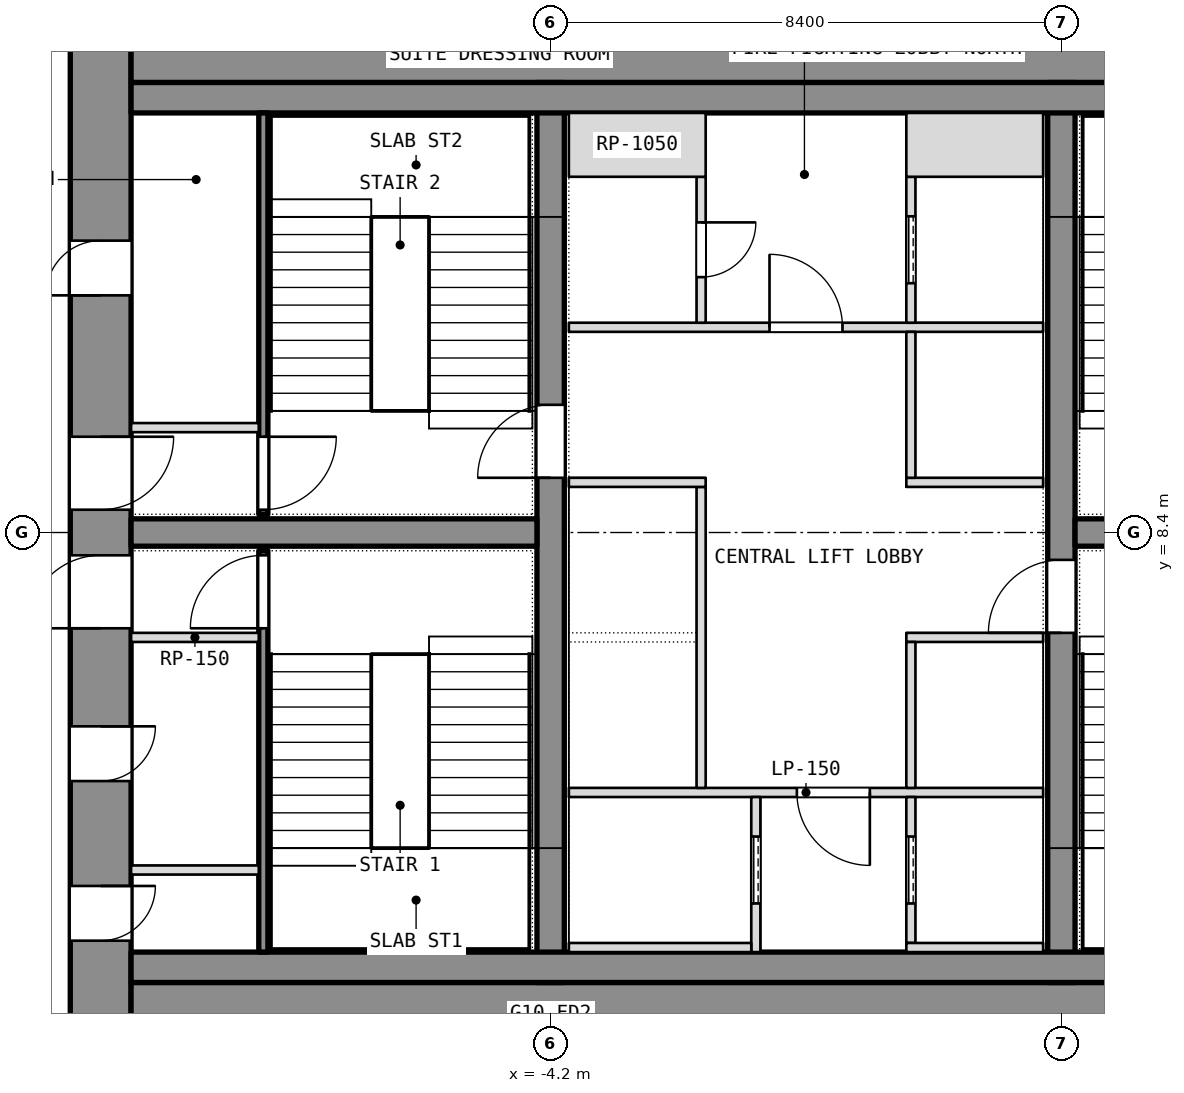
"""IFC4 building model, lengths in metres.
Left out: names, types, materials, properties, quantities, classifications, styles, units other than length and angle.
Written with IfcOpenShell. Run it as: python <this file> out.ifc"""

import sys

from ifc_helpers import new_model, si_unit, direction, frame, frame_2d, origin, place, context, subcontext, project, spatial, rectangle, extrude, element, fill, save


model = new_model("IFC4")
c1 = context("Model", 3, precision=1e-05, world=origin(), true_north=direction((0.0, 1.0)))
c2 = subcontext(c1, "Body", "Model", "MODEL_VIEW")
j1 = project(units=[si_unit("LENGTHUNIT", "METRE"), si_unit("PLANEANGLEUNIT", "RADIAN")], contexts=[c1])
p1 = place(None, origin())
s1 = spatial("IfcSite", under=j1, at=p1, CompositionType="ELEMENT")
p2 = place(p1, origin())
s2 = spatial("IfcBuilding", under=s1, at=p2, CompositionType="ELEMENT")
p3 = place(p2, frame((0.0, 0.0, 130.1)))
s3 = spatial("IfcBuildingStorey", under=s2, at=p3, CompositionType="ELEMENT", Elevation=130.1)
p4 = place(p3, frame((-11.6, 0.0, 0.0), z_axis=(0.0, 0.0, 1.0), x_axis=(0.0, 1.0, 0.0)))
e1 = element("IfcWall", 1, at=p4, inside=s3, PredefinedType="SHEAR", context=c2, shape_type="SweptSolid", body=[
    extrude(rectangle(XDim=16.8, YDim=1.0, at=frame_2d((8.4, 0.0))), origin(), (0.0, 0.0, 1.0), 3.6),
])
p5 = place(p4, frame((1.688, 0.0, 0.0)))
e2 = element("IfcOpeningElement", 2, at=p5, cuts=e1, PredefinedType="OPENING", context=c2, shape_type="SweptSolid", body=[
    extrude(rectangle(XDim=0.9, YDim=2.1, at=frame_2d((0.45, 1.05))), frame((0.0, 0.5, 0.0), z_axis=(0.0, -1.0, 0.0), x_axis=(1.0, 0.0, 0.0)), (0.0, 0.0, 1.0), 1.0),
])
p6 = place(p4, frame((4.312, 0.0, 0.0)))
e3 = element("IfcOpeningElement", 3, at=p6, cuts=e1, PredefinedType="OPENING", context=c2, shape_type="SweptSolid", body=[
    extrude(rectangle(XDim=0.9, YDim=2.1, at=frame_2d((0.45, 1.05))), frame((0.0, 0.5, 0.0), z_axis=(0.0, -1.0, 0.0), x_axis=(1.0, 0.0, 0.0)), (0.0, 0.0, 1.0), 1.0),
])
p7 = place(p4, frame((6.825, 0.0, 0.0)))
e4 = element("IfcOpeningElement", 4, at=p7, cuts=e1, PredefinedType="OPENING", context=c2, shape_type="SweptSolid", body=[
    extrude(rectangle(XDim=1.2, YDim=2.1, at=frame_2d((0.6, 1.05))), frame((0.0, 0.5, 0.0), z_axis=(0.0, -1.0, 0.0), x_axis=(1.0, 0.0, 0.0)), (0.0, 0.0, 1.0), 1.0),
])
p8 = place(p4, frame((12.3, 0.0, 0.0)))
e5 = element("IfcOpeningElement", 5, at=p8, cuts=e1, PredefinedType="OPENING", context=c2, shape_type="SweptSolid", body=[
    extrude(rectangle(XDim=0.9, YDim=2.1, at=frame_2d((0.45, 1.05))), frame((0.0, 0.5, 0.0), z_axis=(0.0, -1.0, 0.0), x_axis=(1.0, 0.0, 0.0)), (0.0, 0.0, 1.0), 1.0),
])
p9 = place(p4, frame((8.775, 0.0, 0.0)))
e6 = element("IfcOpeningElement", 6, at=p9, cuts=e1, PredefinedType="OPENING", context=c2, shape_type="SweptSolid", body=[
    extrude(rectangle(XDim=1.2, YDim=2.1, at=frame_2d((0.6, 1.05))), frame((0.0, 0.5, 0.0), z_axis=(0.0, -1.0, 0.0), x_axis=(1.0, 0.0, 0.0)), (0.0, 0.0, 1.0), 1.0),
])
for number, where, z_axis, x_axis in (
    (7, (-11.1, 0.5, 0.0), (0.0, 0.0, 1.0), (1.0, 0.0, 0.0)),
    (8, (-11.1, 16.3, 0.0), (0.0, 0.0, 1.0), (1.0, 0.0, 0.0)),
):
    element("IfcWall", number, at=place(p3, frame(where, z_axis=z_axis, x_axis=x_axis)), inside=s3, PredefinedType="SHEAR", context=c2, shape_type="SweptSolid", body=[
        extrude(rectangle(XDim=22.2, YDim=1.0, at=frame_2d((11.1, 0.0))), origin(), (0.0, 0.0, 1.0), 3.6),
    ])
p10 = place(p3, frame((-4.2, 1.0, 0.0), z_axis=(0.0, 0.0, 1.0), x_axis=(0.0, 1.0, 0.0)))
e9 = element("IfcWall", 9, at=p10, inside=s3, PredefinedType="SHEAR", context=c2, shape_type="SweptSolid", body=[
    extrude(rectangle(XDim=14.8, YDim=0.45, at=frame_2d((7.4, 0.0))), origin(), (0.0, 0.0, 1.0), 3.6),
])
p11 = place(p10, frame((8.3, 0.0, 0.0)))
e10 = element("IfcOpeningElement", 10, at=p11, cuts=e9, PredefinedType="OPENING", context=c2, shape_type="SweptSolid", body=[
    extrude(rectangle(XDim=1.2, YDim=2.1, at=frame_2d((0.6, 1.05))), frame((0.0, 0.225, 0.0), z_axis=(0.0, -1.0, 0.0), x_axis=(1.0, 0.0, 0.0)), (0.0, 0.0, 1.0), 0.45),
])
p12 = place(p3, frame((4.2, 1.0, 0.0), z_axis=(0.0, 0.0, 1.0), x_axis=(0.0, 1.0, 0.0)))
e11 = element("IfcWall", 11, at=p12, inside=s3, PredefinedType="SHEAR", context=c2, shape_type="SweptSolid", body=[
    extrude(rectangle(XDim=14.8, YDim=0.45, at=frame_2d((7.4, 0.0))), origin(), (0.0, 0.0, 1.0), 3.6),
])
p13 = place(p12, frame((5.75, 0.0, 0.0)))
e12 = element("IfcOpeningElement", 12, at=p13, cuts=e11, PredefinedType="OPENING", context=c2, shape_type="SweptSolid", body=[
    extrude(rectangle(XDim=1.2, YDim=2.1, at=frame_2d((0.6, 1.05))), frame((0.0, 0.225, 0.0), z_axis=(0.0, -1.0, 0.0), x_axis=(1.0, 0.0, 0.0)), (0.0, 0.0, 1.0), 0.45),
])
for number, where, z_axis, x_axis in (
    (13, (-11.1, 8.4, 0.0), (0.0, 0.0, 1.0), (1.0, 0.0, 0.0)),
    (14, (4.425, 8.4, 0.0), (0.0, 0.0, 1.0), (1.0, 0.0, 0.0)),
):
    element("IfcWall", number, at=place(p3, frame(where, z_axis=z_axis, x_axis=x_axis)), inside=s3, PredefinedType="SHEAR", context=c2, shape_type="SweptSolid", body=[
        extrude(rectangle(XDim=6.675, YDim=0.45, at=frame_2d((3.337, 0.0))), origin(), (0.0, 0.0, 1.0), 3.6),
    ])
for number, where, z_axis, x_axis in (
    (15, (-11.1, 1.25, 0.0), (0.0, 0.0, 1.0), (1.0, 0.0, 0.0)),
    (16, (-11.1, 15.55, 0.0), (0.0, 0.0, 1.0), (1.0, 0.0, 0.0)),
):
    element("IfcWall", number, at=place(p3, frame(where, z_axis=z_axis, x_axis=x_axis)), inside=s3, PredefinedType="PARTITIONING", context=c2, shape_type="SweptSolid", body=[
        extrude(rectangle(XDim=22.2, YDim=0.5, at=frame_2d((11.1, 0.0))), origin(), (0.0, 0.0, 1.0), 3.34),
    ])
p14 = place(p3, frame((-8.925, 1.5, 0.0), z_axis=(0.0, 0.0, 1.0), x_axis=(0.0, 1.0, 0.0)))
e17 = element("IfcWall", 17, at=p14, inside=s3, PredefinedType="SHEAR", context=c2, shape_type="SweptSolid", body=[
    extrude(rectangle(XDim=6.6, YDim=0.15, at=frame_2d((3.3, 0.0))), origin(), (0.0, 0.0, 1.0), 3.34),
])
p15 = place(p14, frame((5.325, 0.0, 0.0)))
e18 = element("IfcOpeningElement", 18, at=p15, cuts=e17, PredefinedType="OPENING", context=c2, shape_type="SweptSolid", body=[
    extrude(rectangle(XDim=1.2, YDim=2.1, at=frame_2d((0.6, 1.05))), frame((0.0, 0.075, 0.0), z_axis=(0.0, -1.0, 0.0), x_axis=(1.0, 0.0, 0.0)), (0.0, 0.0, 1.0), 0.15),
])
for number, where, z_axis, x_axis in (
    (19, (-11.1, 6.675, 0.0), (0.0, 0.0, 1.0), (1.0, 0.0, 0.0)),
    (20, (-11.1, 2.85, 0.0), (0.0, 0.0, 1.0), (1.0, 0.0, 0.0)),
):
    element("IfcWall", number, at=place(p3, frame(where, z_axis=z_axis, x_axis=x_axis)), inside=s3, PredefinedType="PARTITIONING", context=c2, shape_type="SweptSolid", body=[
        extrude(rectangle(XDim=2.1, YDim=0.15, at=frame_2d((1.05, 0.0))), origin(), (0.0, 0.0, 1.0), 3.34),
    ])
p16 = place(p3, frame((-8.925, 8.7, 0.0), z_axis=(0.0, 0.0, 1.0), x_axis=(0.0, 1.0, 0.0)))
e21 = element("IfcWall", 21, at=p16, inside=s3, PredefinedType="SHEAR", context=c2, shape_type="SweptSolid", body=[
    extrude(rectangle(XDim=6.6, YDim=0.15, at=frame_2d((3.3, 0.0))), origin(), (0.0, 0.0, 1.0), 3.34),
])
p17 = place(p16, frame((0.075, 0.0, 0.0)))
e22 = element("IfcOpeningElement", 22, at=p17, cuts=e21, PredefinedType="OPENING", context=c2, shape_type="SweptSolid", body=[
    extrude(rectangle(XDim=1.2, YDim=2.1, at=frame_2d((0.6, 1.05))), frame((0.0, 0.075, 0.0), z_axis=(0.0, -1.0, 0.0), x_axis=(1.0, 0.0, 0.0)), (0.0, 0.0, 1.0), 0.15),
])
p18 = place(p3, frame((-11.1, 10.125, 0.0), z_axis=(0.0, 0.0, 1.0), x_axis=(1.0, 0.0, 0.0)))
e23 = element("IfcWall", 23, at=p18, inside=s3, PredefinedType="PARTITIONING", context=c2, shape_type="SweptSolid", body=[
    extrude(rectangle(XDim=2.1, YDim=0.15, at=frame_2d((1.05, 0.0))), origin(), (0.0, 0.0, 1.0), 3.34),
])
p19 = place(p3, frame((-3.9, 4.125, 0.0), z_axis=(0.0, 0.0, 1.0), x_axis=(1.0, 0.0, 0.0)))
e24 = element("IfcWall", 24, at=p19, inside=s3, PredefinedType="PARTITIONING", context=c2, shape_type="SweptSolid", body=[
    extrude(rectangle(XDim=7.8, YDim=0.15, at=frame_2d((3.9, 0.0))), origin(), (0.0, 0.0, 1.0), 3.34),
])
p20 = place(p19, frame((3.75, 0.0, 0.0)))
e25 = element("IfcOpeningElement", 25, at=p20, cuts=e24, PredefinedType="OPENING", context=c2, shape_type="SweptSolid", body=[
    extrude(rectangle(XDim=1.2, YDim=2.1, at=frame_2d((0.6, 1.05))), frame((0.0, 0.075, 0.0), z_axis=(0.0, -1.0, 0.0), x_axis=(1.0, 0.0, 0.0)), (0.0, 0.0, 1.0), 0.15),
])
p21 = place(p3, frame((-3.9, 11.775, 0.0), z_axis=(0.0, 0.0, 1.0), x_axis=(1.0, 0.0, 0.0)))
e26 = element("IfcWall", 26, at=p21, inside=s3, PredefinedType="PARTITIONING", context=c2, shape_type="SweptSolid", body=[
    extrude(rectangle(XDim=7.8, YDim=0.15, at=frame_2d((3.9, 0.0))), origin(), (0.0, 0.0, 1.0), 3.34),
])
p22 = place(p21, frame((3.3, 0.0, 0.0)))
e27 = element("IfcOpeningElement", 27, at=p22, cuts=e26, PredefinedType="OPENING", context=c2, shape_type="SweptSolid", body=[
    extrude(rectangle(XDim=1.2, YDim=2.1, at=frame_2d((0.6, 1.05))), frame((0.0, 0.075, 0.0), z_axis=(0.0, -1.0, 0.0), x_axis=(1.0, 0.0, 0.0)), (0.0, 0.0, 1.0), 0.15),
])
p23 = place(p3, frame((-0.825, 1.5, 0.0), z_axis=(0.0, 0.0, 1.0), x_axis=(0.0, 1.0, 0.0)))
e28 = element("IfcWall", 28, at=p23, inside=s3, PredefinedType="SHEAR", context=c2, shape_type="SweptSolid", body=[
    extrude(rectangle(XDim=2.55, YDim=0.15, at=frame_2d((1.275, 0.0))), origin(), (0.0, 0.0, 1.0), 3.6),
])
p24 = place(p23, frame((0.8, 0.0, 0.0)))
e29 = element("IfcOpeningElement", 29, at=p24, cuts=e28, PredefinedType="OPENING", context=c2, shape_type="SweptSolid", body=[
    extrude(rectangle(XDim=1.1, YDim=2.1, at=frame_2d((0.55, 1.05))), frame((0.0, 0.075, 0.0), z_axis=(0.0, -1.0, 0.0), x_axis=(1.0, 0.0, 0.0)), (0.0, 0.0, 1.0), 0.15),
])
p25 = place(p3, frame((-3.9, 1.575, 0.0), z_axis=(0.0, 0.0, 1.0), x_axis=(1.0, 0.0, 0.0)))
e30 = element("IfcWall", 30, at=p25, inside=s3, PredefinedType="SHEAR", context=c2, shape_type="SweptSolid", body=[
    extrude(rectangle(XDim=3.0, YDim=0.15, at=frame_2d((1.5, 0.0))), origin(), (0.0, 0.0, 1.0), 3.6),
])
p26 = place(p3, frame((-1.725, 4.2, 0.0), z_axis=(0.0, 0.0, 1.0), x_axis=(0.0, 1.0, 0.0)))
e31 = element("IfcWall", 31, at=p26, inside=s3, PredefinedType="SHEAR", context=c2, shape_type="SweptSolid", body=[
    extrude(rectangle(XDim=4.95, YDim=0.15, at=frame_2d((2.475, 0.0))), origin(), (0.0, 0.0, 1.0), 3.6),
])
p27 = place(p3, frame((-3.9, 9.225, 0.0), z_axis=(0.0, 0.0, 1.0), x_axis=(1.0, 0.0, 0.0)))
e32 = element("IfcWall", 32, at=p27, inside=s3, PredefinedType="SHEAR", context=c2, shape_type="SweptSolid", body=[
    extrude(rectangle(XDim=2.25, YDim=0.15, at=frame_2d((1.125, 0.0))), origin(), (0.0, 0.0, 1.0), 3.6),
])
p28 = place(p3, frame((-1.725, 11.85, 0.0), z_axis=(0.0, 0.0, 1.0), x_axis=(0.0, 1.0, 0.0)))
e33 = element("IfcWall", 33, at=p28, inside=s3, PredefinedType="PARTITIONING", context=c2, shape_type="SweptSolid", body=[
    extrude(rectangle(XDim=2.4, YDim=0.15, at=frame_2d((1.2, 0.0))), origin(), (0.0, 0.0, 1.0), 3.34),
])
p29 = place(p28, frame((0.75, 0.0, 0.0)))
e34 = element("IfcOpeningElement", 34, at=p29, cuts=e33, PredefinedType="OPENING", context=c2, shape_type="SweptSolid", body=[
    extrude(rectangle(XDim=0.9, YDim=2.1, at=frame_2d((0.45, 1.05))), frame((0.0, 0.075, 0.0), z_axis=(0.0, -1.0, 0.0), x_axis=(1.0, 0.0, 0.0)), (0.0, 0.0, 1.0), 0.15),
])
p30 = place(p3, frame((-3.9, 14.775, 0.0), z_axis=(0.0, 0.0, 1.0), x_axis=(1.0, 0.0, 0.0)))
e35 = element("IfcWall", 35, at=p30, inside=s3, PredefinedType="PARTITIONING", context=c2, shape_type="SweptSolid", body=[
    extrude(rectangle(XDim=2.25, YDim=1.05, at=frame_2d((1.125, 0.0))), origin(), (0.0, 0.0, 1.0), 3.34),
])
p31 = place(p3, frame((1.725, 1.65, 0.0), z_axis=(0.0, 0.0, 1.0), x_axis=(0.0, 1.0, 0.0)))
e36 = element("IfcWall", 36, at=p31, inside=s3, PredefinedType="SHEAR", context=c2, shape_type="SweptSolid", body=[
    extrude(rectangle(XDim=2.4, YDim=0.15, at=frame_2d((1.2, 0.0))), origin(), (0.0, 0.0, 1.0), 3.6),
])
p32 = place(p31, frame((0.65, 0.0, 0.0)))
e37 = element("IfcOpeningElement", 37, at=p32, cuts=e36, PredefinedType="OPENING", context=c2, shape_type="SweptSolid", body=[
    extrude(rectangle(XDim=1.1, YDim=2.1, at=frame_2d((0.55, 1.05))), frame((0.0, 0.075, 0.0), z_axis=(0.0, -1.0, 0.0), x_axis=(1.0, 0.0, 0.0)), (0.0, 0.0, 1.0), 0.15),
])
p33 = place(p3, frame((1.65, 1.575, 0.0), z_axis=(0.0, 0.0, 1.0), x_axis=(1.0, 0.0, 0.0)))
e38 = element("IfcWall", 38, at=p33, inside=s3, PredefinedType="SHEAR", context=c2, shape_type="SweptSolid", body=[
    extrude(rectangle(XDim=2.25, YDim=0.15, at=frame_2d((1.125, 0.0))), origin(), (0.0, 0.0, 1.0), 3.6),
])
p34 = place(p3, frame((1.725, 11.85, 0.0), z_axis=(0.0, 0.0, 1.0), x_axis=(0.0, 1.0, 0.0)))
e39 = element("IfcWall", 39, at=p34, inside=s3, PredefinedType="SHEAR", context=c2, shape_type="SweptSolid", body=[
    extrude(rectangle(XDim=2.4, YDim=0.15, at=frame_2d((1.2, 0.0))), origin(), (0.0, 0.0, 1.0), 3.6),
])
p35 = place(p34, frame((0.65, 0.0, 0.0)))
e40 = element("IfcOpeningElement", 40, at=p35, cuts=e39, PredefinedType="OPENING", context=c2, shape_type="SweptSolid", body=[
    extrude(rectangle(XDim=1.1, YDim=2.1, at=frame_2d((0.55, 1.05))), frame((0.0, 0.075, 0.0), z_axis=(0.0, -1.0, 0.0), x_axis=(1.0, 0.0, 0.0)), (0.0, 0.0, 1.0), 0.15),
])
p36 = place(p3, frame((1.65, 14.775, 0.0), z_axis=(0.0, 0.0, 1.0), x_axis=(1.0, 0.0, 0.0)))
e41 = element("IfcWall", 41, at=p36, inside=s3, PredefinedType="SHEAR", context=c2, shape_type="SweptSolid", body=[
    extrude(rectangle(XDim=2.25, YDim=1.05, at=frame_2d((1.125, 0.0))), origin(), (0.0, 0.0, 1.0), 3.6),
])
for number, where, z_axis, x_axis in (
    (42, (1.65, 6.675, 0.0), (0.0, 0.0, 1.0), (1.0, 0.0, 0.0)),
    (43, (1.65, 9.225, 0.0), (0.0, 0.0, 1.0), (1.0, 0.0, 0.0)),
):
    element("IfcWall", number, at=place(p3, frame(where, z_axis=z_axis, x_axis=x_axis)), inside=s3, PredefinedType="SHEAR", context=c2, shape_type="SweptSolid", body=[
        extrude(rectangle(XDim=2.25, YDim=0.15, at=frame_2d((1.125, 0.0))), origin(), (0.0, 0.0, 1.0), 3.6),
    ])
p37 = place(p3, frame((1.725, 4.2, 0.0), z_axis=(0.0, 0.0, 1.0), x_axis=(0.0, 1.0, 0.0)))
e44 = element("IfcWall", 44, at=p37, inside=s3, PredefinedType="SHEAR", context=c2, shape_type="SweptSolid", body=[
    extrude(rectangle(XDim=2.4, YDim=0.15, at=frame_2d((1.2, 0.0))), origin(), (0.0, 0.0, 1.0), 3.6),
])
p38 = place(p3, frame((1.725, 9.3, 0.0), z_axis=(0.0, 0.0, 1.0), x_axis=(0.0, 1.0, 0.0)))
e45 = element("IfcWall", 45, at=p38, inside=s3, PredefinedType="SHEAR", context=c2, shape_type="SweptSolid", body=[
    extrude(rectangle(XDim=2.4, YDim=0.15, at=frame_2d((1.2, 0.0))), origin(), (0.0, 0.0, 1.0), 3.6),
])
p39 = place(p5, origin())
e46 = element("IfcDoor", 46, at=p39, inside=s3, OperationType="SINGLE_SWING_LEFT", PredefinedType="DOOR", context=c2, shape_type="SweptSolid", body=[
    extrude(rectangle(XDim=0.9, YDim=2.1, at=frame_2d((0.45, 1.05))), frame((0.0, 0.025, 0.0), z_axis=(0.0, -1.0, 0.0), x_axis=(1.0, 0.0, 0.0)), (0.0, 0.0, 1.0), 0.05),
])
fill(e2, e46)
p40 = place(p6, origin())
e47 = element("IfcDoor", 47, at=p40, inside=s3, OperationType="SINGLE_SWING_LEFT", PredefinedType="DOOR", context=c2, shape_type="SweptSolid", body=[
    extrude(rectangle(XDim=0.9, YDim=2.1, at=frame_2d((0.45, 1.05))), frame((0.0, 0.025, 0.0), z_axis=(0.0, -1.0, 0.0), x_axis=(1.0, 0.0, 0.0)), (0.0, 0.0, 1.0), 0.05),
])
fill(e3, e47)
p41 = place(p7, origin())
e48 = element("IfcDoor", 48, at=p41, inside=s3, OperationType="SINGLE_SWING_LEFT", PredefinedType="DOOR", context=c2, shape_type="SweptSolid", body=[
    extrude(rectangle(XDim=1.2, YDim=2.1, at=frame_2d((0.6, 1.05))), frame((0.0, 0.025, 0.0), z_axis=(0.0, -1.0, 0.0), x_axis=(1.0, 0.0, 0.0)), (0.0, 0.0, 1.0), 0.05),
])
fill(e4, e48)
p42 = place(p15, origin())
e49 = element("IfcDoor", 49, at=p42, inside=s3, OperationType="SINGLE_SWING_LEFT", PredefinedType="DOOR", context=c2, shape_type="SweptSolid", body=[
    extrude(rectangle(XDim=1.2, YDim=2.1, at=frame_2d((0.6, 1.05))), frame((0.0, 0.025, 0.0), z_axis=(0.0, -1.0, 0.0), x_axis=(1.0, 0.0, 0.0)), (0.0, 0.0, 1.0), 0.05),
])
fill(e18, e49)
p43 = place(p8, origin())
e50 = element("IfcDoor", 50, at=p43, inside=s3, OperationType="SINGLE_SWING_LEFT", PredefinedType="DOOR", context=c2, shape_type="SweptSolid", body=[
    extrude(rectangle(XDim=0.9, YDim=2.1, at=frame_2d((0.45, 1.05))), frame((0.0, 0.025, 0.0), z_axis=(0.0, -1.0, 0.0), x_axis=(1.0, 0.0, 0.0)), (0.0, 0.0, 1.0), 0.05),
])
fill(e5, e50)
p44 = place(p9, origin())
e51 = element("IfcDoor", 51, at=p44, inside=s3, OperationType="SINGLE_SWING_LEFT", PredefinedType="DOOR", context=c2, shape_type="SweptSolid", body=[
    extrude(rectangle(XDim=1.2, YDim=2.1, at=frame_2d((0.6, 1.05))), frame((0.0, 0.025, 0.0), z_axis=(0.0, -1.0, 0.0), x_axis=(1.0, 0.0, 0.0)), (0.0, 0.0, 1.0), 0.05),
])
fill(e6, e51)
p45 = place(p17, origin())
e52 = element("IfcDoor", 52, at=p45, inside=s3, OperationType="SINGLE_SWING_LEFT", PredefinedType="DOOR", context=c2, shape_type="SweptSolid", body=[
    extrude(rectangle(XDim=1.2, YDim=2.1, at=frame_2d((0.6, 1.05))), frame((0.0, 0.025, 0.0), z_axis=(0.0, -1.0, 0.0), x_axis=(1.0, 0.0, 0.0)), (0.0, 0.0, 1.0), 0.05),
])
fill(e22, e52)
p46 = place(p24, origin())
e53 = element("IfcDoor", 53, at=p46, inside=s3, OperationType="SLIDING_TO_LEFT", PredefinedType="DOOR", context=c2, shape_type="SweptSolid", body=[
    extrude(rectangle(XDim=1.1, YDim=2.1, at=frame_2d((0.55, 1.05))), frame((0.0, 0.025, 0.0), z_axis=(0.0, -1.0, 0.0), x_axis=(1.0, 0.0, 0.0)), (0.0, 0.0, 1.0), 0.05),
])
fill(e29, e53)
p47 = place(p32, origin())
e54 = element("IfcDoor", 54, at=p47, inside=s3, OperationType="SLIDING_TO_LEFT", PredefinedType="DOOR", context=c2, shape_type="SweptSolid", body=[
    extrude(rectangle(XDim=1.1, YDim=2.1, at=frame_2d((0.55, 1.05))), frame((0.0, 0.025, 0.0), z_axis=(0.0, -1.0, 0.0), x_axis=(1.0, 0.0, 0.0)), (0.0, 0.0, 1.0), 0.05),
])
fill(e37, e54)
p48 = place(p35, origin())
e55 = element("IfcDoor", 55, at=p48, inside=s3, OperationType="SLIDING_TO_LEFT", PredefinedType="DOOR", context=c2, shape_type="SweptSolid", body=[
    extrude(rectangle(XDim=1.1, YDim=2.1, at=frame_2d((0.55, 1.05))), frame((0.0, 0.025, 0.0), z_axis=(0.0, -1.0, 0.0), x_axis=(1.0, 0.0, 0.0)), (0.0, 0.0, 1.0), 0.05),
])
fill(e40, e55)
p49 = place(p20, origin())
e56 = element("IfcDoor", 56, at=p49, inside=s3, OperationType="SINGLE_SWING_LEFT", PredefinedType="DOOR", context=c2, shape_type="SweptSolid", body=[
    extrude(rectangle(XDim=1.2, YDim=2.1, at=frame_2d((0.6, 1.05))), frame((0.0, 0.025, 0.0), z_axis=(0.0, -1.0, 0.0), x_axis=(1.0, 0.0, 0.0)), (0.0, 0.0, 1.0), 0.05),
])
fill(e25, e56)
p50 = place(p22, origin())
e57 = element("IfcDoor", 57, at=p50, inside=s3, OperationType="SINGLE_SWING_LEFT", PredefinedType="DOOR", context=c2, shape_type="SweptSolid", body=[
    extrude(rectangle(XDim=1.2, YDim=2.1, at=frame_2d((0.6, 1.05))), frame((0.0, 0.025, 0.0), z_axis=(0.0, -1.0, 0.0), x_axis=(1.0, 0.0, 0.0)), (0.0, 0.0, 1.0), 0.05),
])
fill(e27, e57)
p51 = place(p29, origin())
e58 = element("IfcDoor", 58, at=p51, inside=s3, OperationType="SINGLE_SWING_LEFT", PredefinedType="DOOR", context=c2, shape_type="SweptSolid", body=[
    extrude(rectangle(XDim=0.9, YDim=2.1, at=frame_2d((0.45, 1.05))), frame((0.0, 0.025, 0.0), z_axis=(0.0, -1.0, 0.0), x_axis=(1.0, 0.0, 0.0)), (0.0, 0.0, 1.0), 0.05),
])
fill(e34, e58)
p52 = place(p11, origin())
e59 = element("IfcDoor", 59, at=p52, inside=s3, OperationType="SINGLE_SWING_LEFT", PredefinedType="DOOR", context=c2, shape_type="SweptSolid", body=[
    extrude(rectangle(XDim=1.2, YDim=2.1, at=frame_2d((0.6, 1.05))), frame((0.0, 0.025, 0.0), z_axis=(0.0, -1.0, 0.0), x_axis=(1.0, 0.0, 0.0)), (0.0, 0.0, 1.0), 0.05),
])
fill(e10, e59)
p53 = place(p13, origin())
e60 = element("IfcDoor", 60, at=p53, inside=s3, OperationType="SINGLE_SWING_LEFT", PredefinedType="DOOR", context=c2, shape_type="SweptSolid", body=[
    extrude(rectangle(XDim=1.2, YDim=2.1, at=frame_2d((0.6, 1.05))), frame((0.0, 0.025, 0.0), z_axis=(0.0, -1.0, 0.0), x_axis=(1.0, 0.0, 0.0)), (0.0, 0.0, 1.0), 0.05),
])
fill(e12, e60)
save(model, sys.argv[1])
